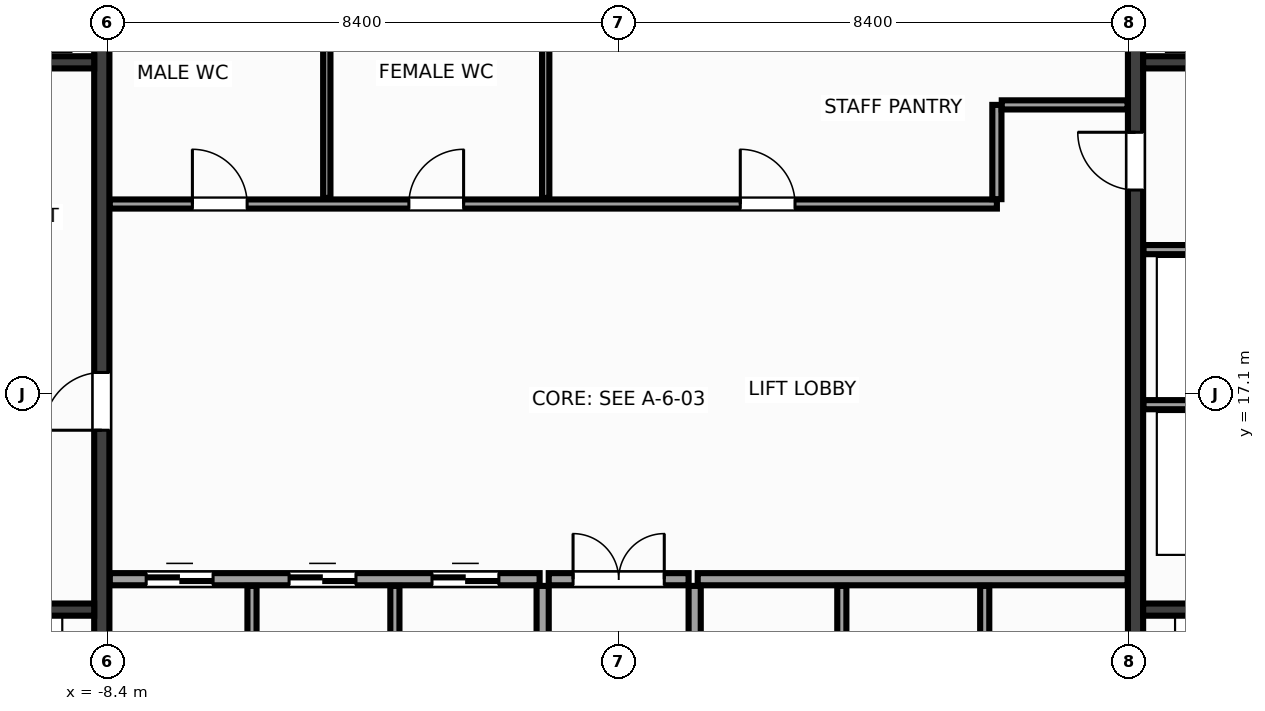
"""IFC4 building model, lengths in metres.
Left out: names, types, materials, properties, quantities, classifications, styles, units other than length and angle.
Written with IfcOpenShell. Run it as: python <this file> out.ifc"""

import sys

from ifc_helpers import new_model, si_unit, direction, frame, frame_2d, origin, place, context, subcontext, project, spatial, rectangle, extrude, source, transform, mapped, element, fill, save


model = new_model("IFC4")
c1 = context("Model", 3, precision=1e-05, world=origin(), true_north=direction((0.0, 1.0)))
c2 = subcontext(c1, "Body", "Model", "MODEL_VIEW")
j1 = project(units=[si_unit("LENGTHUNIT", "METRE"), si_unit("PLANEANGLEUNIT", "RADIAN")], contexts=[c1])
p1 = place(None, origin())
s1 = spatial("IfcSite", under=j1, at=p1, CompositionType="ELEMENT")
p2 = place(p1, origin())
s2 = spatial("IfcBuilding", under=s1, at=p2, CompositionType="ELEMENT")
p3 = place(p2, frame((0.0, 0.0, 63.2)))
s3 = spatial("IfcBuildingStorey", under=s2, at=p3, CompositionType="ELEMENT", Elevation=63.2)
m1 = source(origin(), c2, "Body", "SweptSolid", [
    extrude(rectangle(XDim=12.8, YDim=0.25, at=frame_2d((6.4, 0.0))), origin(), (0.0, 0.0, 1.0), 3.6),
])
p4 = place(p3, frame((-8.5, 10.6, 0.0), z_axis=(0.0, 0.0, 1.0), x_axis=(0.0, 1.0, 0.0)))
e1 = element("IfcWall", 1, at=p4, inside=s3, PredefinedType="SHEAR", context=c2, shape_type="MappedRepresentation", body=[
    mapped(m1, transform((0.0, 0.0, 0.0), x_axis=(1.0, 0.0, 0.0), y_axis=(0.0, 1.0, 0.0), z_axis=(0.0, 0.0, 1.0), scale=1.0)),
])
p5 = place(p4, frame((5.9, 0.0, 0.0)))
e2 = element("IfcOpeningElement", 2, at=p5, cuts=e1, PredefinedType="OPENING", context=c2, shape_type="SweptSolid", body=[
    extrude(rectangle(XDim=0.95, YDim=2.15, at=frame_2d((0.475, 1.075))), frame((0.0, 0.137, 0.0), z_axis=(0.0, -1.0, 0.0), x_axis=(1.0, 0.0, 0.0)), (0.0, 0.0, 1.0), 0.274),
])
p6 = place(p3, frame((8.5, 10.6, 0.0), z_axis=(0.0, 0.0, 1.0), x_axis=(0.0, 1.0, 0.0)))
e3 = element("IfcWall", 3, at=p6, inside=s3, PredefinedType="SHEAR", context=c2, shape_type="MappedRepresentation", body=[
    mapped(m1, transform((0.0, 0.0, 0.0), x_axis=(1.0, 0.0, 0.0), y_axis=(0.0, 1.0, 0.0), z_axis=(0.0, 0.0, 1.0), scale=1.0)),
])
p7 = place(p6, frame((9.85, 0.0, 0.0)))
e4 = element("IfcOpeningElement", 4, at=p7, cuts=e3, PredefinedType="OPENING", context=c2, shape_type="SweptSolid", body=[
    extrude(rectangle(XDim=0.95, YDim=2.15, at=frame_2d((0.475, 1.075))), frame((0.0, 0.137, 0.0), z_axis=(0.0, -1.0, 0.0), x_axis=(1.0, 0.0, 0.0)), (0.0, 0.0, 1.0), 0.274),
])
m2 = source(origin(), c2, "Body", "SweptSolid", [
    extrude(rectangle(XDim=2.825, YDim=0.2, at=frame_2d((1.413, 0.0))), origin(), (0.0, 0.0, 1.0), 3.6),
])
for number, where, z_axis, x_axis in (
    (5, (-11.45, 13.55, 0.0), (0.0, 0.0, 1.0), (1.0, 0.0, 0.0)),
    (6, (8.625, 13.55, 0.0), (0.0, 0.0, 1.0), (1.0, 0.0, 0.0)),
):
    element("IfcWall", number, at=place(p3, frame(where, z_axis=z_axis, x_axis=x_axis)), inside=s3, PredefinedType="SHEAR", context=c2, shape_type="MappedRepresentation", body=[
        mapped(m2, transform((0.0, 0.0, 0.0), x_axis=(1.0, 0.0, 0.0), y_axis=(0.0, 1.0, 0.0), z_axis=(0.0, 0.0, 1.0), scale=1.0)),
    ])
m3 = source(origin(), c2, "Body", "SweptSolid", [
    extrude(rectangle(XDim=3.02, YDim=0.2, at=frame_2d((1.51, 0.0))), origin(), (0.0, 0.0, 1.0), 3.6),
])
for number, where, z_axis, x_axis in (
    (7, (-11.645, 22.55, 0.0), (0.0, 0.0, 1.0), (1.0, 0.0, 0.0)),
    (8, (8.625, 22.55, 0.0), (0.0, 0.0, 1.0), (1.0, 0.0, 0.0)),
):
    element("IfcWall", number, at=place(p3, frame(where, z_axis=z_axis, x_axis=x_axis)), inside=s3, PredefinedType="SHEAR", context=c2, shape_type="MappedRepresentation", body=[
        mapped(m3, transform((0.0, 0.0, 0.0), x_axis=(1.0, 0.0, 0.0), y_axis=(0.0, 1.0, 0.0), z_axis=(0.0, 0.0, 1.0), scale=1.0)),
    ])
m4 = source(origin(), c2, "Body", "SweptSolid", [
    extrude(rectangle(XDim=3.01, YDim=0.15, at=frame_2d((1.505, 0.0))), origin(), (0.0, 0.0, 1.0), 3.36),
])
for number, where, z_axis, x_axis in (
    (9, (8.63, 16.92, 0.0), (0.0, 0.0, 1.0), (1.0, 0.0, 0.0)),
    (10, (8.63, 19.47, 0.0), (0.0, 0.0, 1.0), (1.0, 0.0, 0.0)),
):
    element("IfcWall", number, at=place(p3, frame(where, z_axis=z_axis, x_axis=x_axis)), inside=s3, PredefinedType="PARTITIONING", context=c2, shape_type="MappedRepresentation", body=[
        mapped(m4, transform((0.0, 0.0, 0.0), x_axis=(1.0, 0.0, 0.0), y_axis=(0.0, 1.0, 0.0), z_axis=(0.0, 0.0, 1.0), scale=1.0)),
    ])
m5 = source(origin(), c2, "Body", "SweptSolid", [
    extrude(rectangle(XDim=7.07, YDim=0.2, at=frame_2d((3.535, 0.0))), origin(), (0.0, 0.0, 1.0), 3.36),
])
p8 = place(p3, frame((-8.37, 14.05, 0.0), z_axis=(0.0, 0.0, 1.0), x_axis=(1.0, 0.0, 0.0)))
e11 = element("IfcWall", 11, at=p8, inside=s3, PredefinedType="PARTITIONING", context=c2, shape_type="MappedRepresentation", body=[
    mapped(m5, transform((0.0, 0.0, 0.0), x_axis=(1.0, 0.0, 0.0), y_axis=(0.0, 1.0, 0.0), z_axis=(0.0, 0.0, 1.0), scale=1.0)),
])
p9 = place(p8, frame((0.6, 0.0, 0.0)))
e12 = element("IfcOpeningElement", 12, at=p9, cuts=e11, PredefinedType="OPENING", context=c2, shape_type="SweptSolid", body=[
    extrude(rectangle(XDim=1.1, YDim=2.15, at=frame_2d((0.55, 1.075))), frame((0.0, 0.112, 0.0), z_axis=(0.0, -1.0, 0.0), x_axis=(1.0, 0.0, 0.0)), (0.0, 0.0, 1.0), 0.224),
])
p10 = place(p8, frame((2.95, 0.0, 0.0)))
e13 = element("IfcOpeningElement", 13, at=p10, cuts=e11, PredefinedType="OPENING", context=c2, shape_type="SweptSolid", body=[
    extrude(rectangle(XDim=1.1, YDim=2.15, at=frame_2d((0.55, 1.075))), frame((0.0, 0.112, 0.0), z_axis=(0.0, -1.0, 0.0), x_axis=(1.0, 0.0, 0.0)), (0.0, 0.0, 1.0), 0.224),
])
p11 = place(p8, frame((5.3, 0.0, 0.0)))
e14 = element("IfcOpeningElement", 14, at=p11, cuts=e11, PredefinedType="OPENING", context=c2, shape_type="SweptSolid", body=[
    extrude(rectangle(XDim=1.1, YDim=2.15, at=frame_2d((0.55, 1.075))), frame((0.0, 0.112, 0.0), z_axis=(0.0, -1.0, 0.0), x_axis=(1.0, 0.0, 0.0)), (0.0, 0.0, 1.0), 0.224),
])
p12 = place(p3, frame((1.3, 14.05, 0.0), z_axis=(0.0, 0.0, 1.0), x_axis=(1.0, 0.0, 0.0)))
e15 = element("IfcWall", 15, at=p12, inside=s3, PredefinedType="PARTITIONING", context=c2, shape_type="MappedRepresentation", body=[
    mapped(m5, transform((0.0, 0.0, 0.0), x_axis=(1.0, 0.0, 0.0), y_axis=(0.0, 1.0, 0.0), z_axis=(0.0, 0.0, 1.0), scale=1.0)),
])
m6 = source(origin(), c2, "Body", "SweptSolid", [
    extrude(rectangle(XDim=3.34, YDim=0.2, at=frame_2d((1.67, 0.0))), origin(), (0.0, 0.0, 1.0), 3.36),
])
for number, where, z_axis, x_axis in (
    (16, (-1.25, 10.6, 0.0), (0.0, 0.0, 1.0), (0.0, 1.0, 0.0)),
    (17, (1.25, 10.6, 0.0), (0.0, 0.0, 1.0), (0.0, 1.0, 0.0)),
):
    element("IfcWall", number, at=place(p3, frame(where, z_axis=z_axis, x_axis=x_axis)), inside=s3, PredefinedType="PARTITIONING", context=c2, shape_type="MappedRepresentation", body=[
        mapped(m6, transform((0.0, 0.0, 0.0), x_axis=(1.0, 0.0, 0.0), y_axis=(0.0, 1.0, 0.0), z_axis=(0.0, 0.0, 1.0), scale=1.0)),
    ])
m7 = source(origin(), c2, "Body", "SweptSolid", [
    extrude(rectangle(XDim=2.3, YDim=0.2, at=frame_2d((1.15, 0.0))), origin(), (0.0, 0.0, 1.0), 3.36),
])
p13 = place(p3, frame((-1.15, 14.05, 0.0), z_axis=(0.0, 0.0, 1.0), x_axis=(1.0, 0.0, 0.0)))
e18 = element("IfcWall", 18, at=p13, inside=s3, PredefinedType="PARTITIONING", context=c2, shape_type="MappedRepresentation", body=[
    mapped(m7, transform((0.0, 0.0, 0.0), x_axis=(1.0, 0.0, 0.0), y_axis=(0.0, 1.0, 0.0), z_axis=(0.0, 0.0, 1.0), scale=1.0)),
])
p14 = place(p13, frame((0.4, 0.0, 0.0)))
e19 = element("IfcOpeningElement", 19, at=p14, cuts=e18, PredefinedType="OPENING", context=c2, shape_type="SweptSolid", body=[
    extrude(rectangle(XDim=1.5, YDim=2.2, at=frame_2d((0.75, 1.1))), frame((0.0, 0.112, 0.0), z_axis=(0.0, -1.0, 0.0), x_axis=(1.0, 0.0, 0.0)), (0.0, 0.0, 1.0), 0.224),
])
m8 = source(origin(), c2, "Body", "SweptSolid", [
    extrude(rectangle(XDim=14.59, YDim=0.15, at=frame_2d((7.295, 0.0))), origin(), (0.0, 0.0, 1.0), 3.36),
])
p15 = place(p3, frame((-8.37, 20.22, 0.0), z_axis=(0.0, 0.0, 1.0), x_axis=(1.0, 0.0, 0.0)))
e20 = element("IfcWall", 20, at=p15, inside=s3, PredefinedType="PARTITIONING", context=c2, shape_type="MappedRepresentation", body=[
    mapped(m8, transform((0.0, 0.0, 0.0), x_axis=(1.0, 0.0, 0.0), y_axis=(0.0, 1.0, 0.0), z_axis=(0.0, 0.0, 1.0), scale=1.0)),
])
p16 = place(p15, frame((1.36, 0.0, 0.0)))
e21 = element("IfcOpeningElement", 21, at=p16, cuts=e20, PredefinedType="OPENING", context=c2, shape_type="SweptSolid", body=[
    extrude(rectangle(XDim=0.9, YDim=2.15, at=frame_2d((0.45, 1.075))), frame((0.0, 0.087, 0.0), z_axis=(0.0, -1.0, 0.0), x_axis=(1.0, 0.0, 0.0)), (0.0, 0.0, 1.0), 0.174),
])
p17 = place(p15, frame((4.92, 0.0, 0.0)))
e22 = element("IfcOpeningElement", 22, at=p17, cuts=e20, PredefinedType="OPENING", context=c2, shape_type="SweptSolid", body=[
    extrude(rectangle(XDim=0.9, YDim=2.15, at=frame_2d((0.45, 1.075))), frame((0.0, 0.087, 0.0), z_axis=(0.0, -1.0, 0.0), x_axis=(1.0, 0.0, 0.0)), (0.0, 0.0, 1.0), 0.174),
])
p18 = place(p15, frame((10.37, 0.0, 0.0)))
e23 = element("IfcOpeningElement", 23, at=p18, cuts=e20, PredefinedType="OPENING", context=c2, shape_type="SweptSolid", body=[
    extrude(rectangle(XDim=0.9, YDim=2.15, at=frame_2d((0.45, 1.075))), frame((0.0, 0.087, 0.0), z_axis=(0.0, -1.0, 0.0), x_axis=(1.0, 0.0, 0.0)), (0.0, 0.0, 1.0), 0.174),
])
m9 = source(origin(), c2, "Body", "SweptSolid", [
    extrude(rectangle(XDim=1.55, YDim=0.15, at=frame_2d((0.775, 0.0))), origin(), (0.0, 0.0, 1.0), 3.36),
])
p19 = place(p3, frame((6.22, 20.3, 0.0), z_axis=(0.0, 0.0, 1.0), x_axis=(0.0, 1.0, 0.0)))
e24 = element("IfcWall", 24, at=p19, inside=s3, PredefinedType="PARTITIONING", context=c2, shape_type="MappedRepresentation", body=[
    mapped(m9, transform((0.0, 0.0, 0.0), x_axis=(1.0, 0.0, 0.0), y_axis=(0.0, 1.0, 0.0), z_axis=(0.0, 0.0, 1.0), scale=1.0)),
])
m10 = source(origin(), c2, "Body", "SweptSolid", [
    extrude(rectangle(XDim=2.07, YDim=0.15, at=frame_2d((1.035, 0.0))), origin(), (0.0, 0.0, 1.0), 3.36),
])
p20 = place(p3, frame((6.3, 21.85, 0.0), z_axis=(0.0, 0.0, 1.0), x_axis=(1.0, 0.0, 0.0)))
e25 = element("IfcWall", 25, at=p20, inside=s3, PredefinedType="PARTITIONING", context=c2, shape_type="MappedRepresentation", body=[
    mapped(m10, transform((0.0, 0.0, 0.0), x_axis=(1.0, 0.0, 0.0), y_axis=(0.0, 1.0, 0.0), z_axis=(0.0, 0.0, 1.0), scale=1.0)),
])
m11 = source(origin(), c2, "Body", "SweptSolid", [
    extrude(rectangle(XDim=3.34, YDim=0.15, at=frame_2d((1.67, 0.0))), origin(), (0.0, 0.0, 1.0), 3.36),
])
for number, where, z_axis, x_axis in (
    (26, (-6.03, 10.6, 0.0), (0.0, 0.0, 1.0), (0.0, 1.0, 0.0)),
    (27, (-3.68, 10.6, 0.0), (0.0, 0.0, 1.0), (0.0, 1.0, 0.0)),
    (28, (3.67, 10.6, 0.0), (0.0, 0.0, 1.0), (0.0, 1.0, 0.0)),
    (29, (6.02, 10.6, 0.0), (0.0, 0.0, 1.0), (0.0, 1.0, 0.0)),
):
    element("IfcWall", number, at=place(p3, frame(where, z_axis=z_axis, x_axis=x_axis)), inside=s3, PredefinedType="PARTITIONING", context=c2, shape_type="MappedRepresentation", body=[
        mapped(m11, transform((0.0, 0.0, 0.0), x_axis=(1.0, 0.0, 0.0), y_axis=(0.0, 1.0, 0.0), z_axis=(0.0, 0.0, 1.0), scale=1.0)),
    ])
m12 = source(origin(), c2, "Body", "SweptSolid", [
    extrude(rectangle(XDim=3.04, YDim=0.12, at=frame_2d((1.52, 0.0))), origin(), (0.0, 0.0, 1.0), 3.36),
])
for number, where, z_axis, x_axis in (
    (30, (-4.8, 20.32, 0.0), (0.0, 0.0, 1.0), (0.0, 1.0, 0.0)),
    (31, (-1.2, 20.32, 0.0), (0.0, 0.0, 1.0), (0.0, 1.0, 0.0)),
):
    element("IfcWall", number, at=place(p3, frame(where, z_axis=z_axis, x_axis=x_axis)), inside=s3, PredefinedType="PARTITIONING", context=c2, shape_type="MappedRepresentation", body=[
        mapped(m12, transform((0.0, 0.0, 0.0), x_axis=(1.0, 0.0, 0.0), y_axis=(0.0, 1.0, 0.0), z_axis=(0.0, 0.0, 1.0), scale=1.0)),
    ])
m13 = source(origin(), c2, "Body", "SweptSolid", [
    extrude(rectangle(XDim=0.95, YDim=2.15, at=frame_2d((0.475, 1.075))), frame((0.0, 0.025, 0.0), z_axis=(0.0, -1.0, 0.0), x_axis=(1.0, 0.0, 0.0)), (0.0, 0.0, 1.0), 0.05),
])
p21 = place(p5, origin())
e32 = element("IfcDoor", 32, at=p21, inside=s3, OperationType="SINGLE_SWING_LEFT", PredefinedType="DOOR", context=c2, shape_type="MappedRepresentation", body=[
    mapped(m13, transform((0.0, 0.0, 0.0), x_axis=(1.0, 0.0, 0.0), y_axis=(0.0, 1.0, 0.0), z_axis=(0.0, 0.0, 1.0), scale=1.0)),
])
fill(e2, e32)
m14 = source(origin(), c2, "Body", "SweptSolid", [
    extrude(rectangle(XDim=0.95, YDim=2.15, at=frame_2d((0.475, 1.075))), frame((0.0, 0.025, 0.0), z_axis=(0.0, -1.0, 0.0), x_axis=(1.0, 0.0, 0.0)), (0.0, 0.0, 1.0), 0.05),
])
p22 = place(p7, origin())
e33 = element("IfcDoor", 33, at=p22, inside=s3, OperationType="SINGLE_SWING_RIGHT", PredefinedType="DOOR", context=c2, shape_type="MappedRepresentation", body=[
    mapped(m14, transform((0.0, 0.0, 0.0), x_axis=(1.0, 0.0, 0.0), y_axis=(0.0, 1.0, 0.0), z_axis=(0.0, 0.0, 1.0), scale=1.0)),
])
fill(e4, e33)
m15 = source(origin(), c2, "Body", "SweptSolid", [
    extrude(rectangle(XDim=1.1, YDim=2.15, at=frame_2d((0.55, 1.075))), frame((0.0, 0.025, 0.0), z_axis=(0.0, -1.0, 0.0), x_axis=(1.0, 0.0, 0.0)), (0.0, 0.0, 1.0), 0.05),
])
p23 = place(p9, origin())
e34 = element("IfcDoor", 34, at=p23, inside=s3, OperationType="DOUBLE_DOOR_SLIDING", PredefinedType="DOOR", context=c2, shape_type="MappedRepresentation", body=[
    mapped(m15, transform((0.0, 0.0, 0.0), x_axis=(1.0, 0.0, 0.0), y_axis=(0.0, 1.0, 0.0), z_axis=(0.0, 0.0, 1.0), scale=1.0)),
])
fill(e12, e34)
p24 = place(p10, origin())
e35 = element("IfcDoor", 35, at=p24, inside=s3, OperationType="DOUBLE_DOOR_SLIDING", PredefinedType="DOOR", context=c2, shape_type="MappedRepresentation", body=[
    mapped(m15, transform((0.0, 0.0, 0.0), x_axis=(1.0, 0.0, 0.0), y_axis=(0.0, 1.0, 0.0), z_axis=(0.0, 0.0, 1.0), scale=1.0)),
])
fill(e13, e35)
p25 = place(p11, origin())
e36 = element("IfcDoor", 36, at=p25, inside=s3, OperationType="DOUBLE_DOOR_SLIDING", PredefinedType="DOOR", context=c2, shape_type="MappedRepresentation", body=[
    mapped(m15, transform((0.0, 0.0, 0.0), x_axis=(1.0, 0.0, 0.0), y_axis=(0.0, 1.0, 0.0), z_axis=(0.0, 0.0, 1.0), scale=1.0)),
])
fill(e14, e36)
m16 = source(origin(), c2, "Body", "SweptSolid", [
    extrude(rectangle(XDim=1.5, YDim=2.2, at=frame_2d((0.75, 1.1))), frame((0.0, 0.025, 0.0), z_axis=(0.0, -1.0, 0.0), x_axis=(1.0, 0.0, 0.0)), (0.0, 0.0, 1.0), 0.05),
])
p26 = place(p14, origin())
e37 = element("IfcDoor", 37, at=p26, inside=s3, OperationType="DOUBLE_DOOR_SINGLE_SWING", PredefinedType="DOOR", context=c2, shape_type="MappedRepresentation", body=[
    mapped(m16, transform((0.0, 0.0, 0.0), x_axis=(1.0, 0.0, 0.0), y_axis=(0.0, 1.0, 0.0), z_axis=(0.0, 0.0, 1.0), scale=1.0)),
])
fill(e19, e37)
m17 = source(origin(), c2, "Body", "SweptSolid", [
    extrude(rectangle(XDim=0.9, YDim=2.15, at=frame_2d((0.45, 1.075))), frame((0.0, 0.025, 0.0), z_axis=(0.0, -1.0, 0.0), x_axis=(1.0, 0.0, 0.0)), (0.0, 0.0, 1.0), 0.05),
])
p27 = place(p16, origin())
e38 = element("IfcDoor", 38, at=p27, inside=s3, OperationType="SINGLE_SWING_LEFT", PredefinedType="DOOR", context=c2, shape_type="MappedRepresentation", body=[
    mapped(m17, transform((0.0, 0.0, 0.0), x_axis=(1.0, 0.0, 0.0), y_axis=(0.0, 1.0, 0.0), z_axis=(0.0, 0.0, 1.0), scale=1.0)),
])
fill(e21, e38)
p28 = place(p17, origin())
e39 = element("IfcDoor", 39, at=p28, inside=s3, OperationType="SINGLE_SWING_RIGHT", PredefinedType="DOOR", context=c2, shape_type="MappedRepresentation", body=[
    mapped(m17, transform((0.0, 0.0, 0.0), x_axis=(1.0, 0.0, 0.0), y_axis=(0.0, 1.0, 0.0), z_axis=(0.0, 0.0, 1.0), scale=1.0)),
])
fill(e22, e39)
p29 = place(p18, origin())
e40 = element("IfcDoor", 40, at=p29, inside=s3, OperationType="SINGLE_SWING_LEFT", PredefinedType="DOOR", context=c2, shape_type="MappedRepresentation", body=[
    mapped(m17, transform((0.0, 0.0, 0.0), x_axis=(1.0, 0.0, 0.0), y_axis=(0.0, 1.0, 0.0), z_axis=(0.0, 0.0, 1.0), scale=1.0)),
])
fill(e23, e40)
save(model, sys.argv[1])
